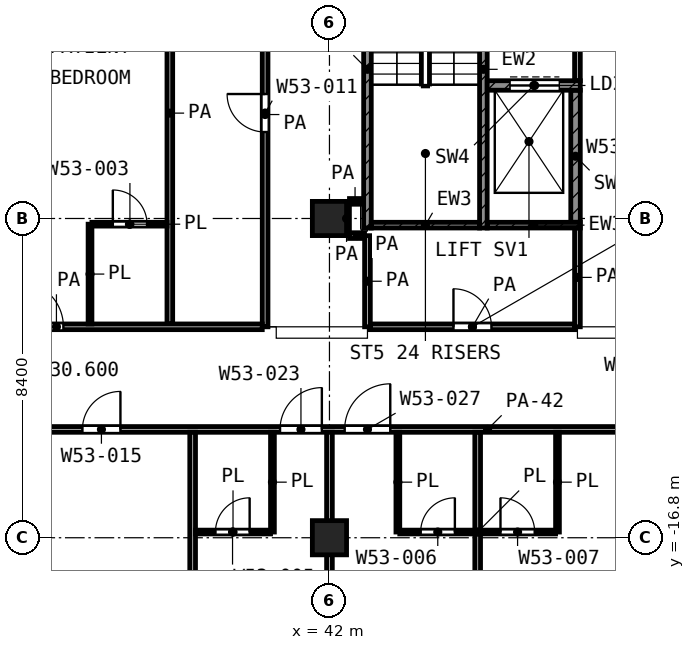
"""IFC4 building model, lengths in metres.
Left out: names, types, materials, properties, quantities, classifications, styles, units other than length and angle.
Written with IfcOpenShell. Run it as: python <this file> out.ifc"""

import sys

from ifc_helpers import new_model, si_unit, direction, frame, frame_2d, origin, origin_2d, place, context, subcontext, project, spatial, rectangle, extrude, element, fill, save


model = new_model("IFC4")
c1 = context("Model", 3, precision=1e-05, world=origin(), true_north=direction((0.0, 1.0)))
c2 = subcontext(c1, "Body", "Model", "MODEL_VIEW")
j1 = project(units=[si_unit("LENGTHUNIT", "METRE"), si_unit("PLANEANGLEUNIT", "RADIAN")], contexts=[c1])
p1 = place(None, origin())
s1 = spatial("IfcSite", under=j1, at=p1, CompositionType="ELEMENT")
p2 = place(p1, origin())
s2 = spatial("IfcBuilding", under=s1, at=p2, CompositionType="ELEMENT")
p3 = place(p2, frame((0.0, 0.0, 230.6)))
s3 = spatial("IfcBuildingStorey", under=s2, at=p3, CompositionType="ELEMENT", Elevation=230.6)
for number, where, z_axis, x_axis in (
    (1, (42.0, -8.4, 0.0), (0.0, 0.0, 1.0), (1.0, 0.0, 0.0)),
    (2, (42.0, -16.8, 0.0), (0.0, 0.0, 1.0), (1.0, 0.0, 0.0)),
):
    element("IfcColumn", number, at=place(p3, frame(where, z_axis=z_axis, x_axis=x_axis)), inside=s3, PredefinedType="COLUMN", context=c2, shape_type="SweptSolid", body=[
        extrude(rectangle(XDim=0.9, YDim=0.9, at=origin_2d()), origin(), (0.0, 0.0, 1.0), 4.2),
    ])
p4 = place(p3, frame((43.0, -8.65, 0.0), z_axis=(0.0, 0.0, 1.0), x_axis=(0.0, 1.0, 0.0)))
e3 = element("IfcWall", 3, at=p4, inside=s3, PredefinedType="SHEAR", context=c2, shape_type="SweptSolid", body=[
    extrude(rectangle(XDim=8.35, YDim=0.2, at=frame_2d((4.175, 0.0))), origin(), (0.0, 0.0, 1.0), 3.6),
])
p5 = place(p4, frame((7.0, 0.0, 0.0)))
e4 = element("IfcOpeningElement", 4, at=p5, cuts=e3, PredefinedType="OPENING", context=c2, shape_type="SweptSolid", body=[
    extrude(rectangle(XDim=1.1, YDim=2.1, at=frame_2d((0.55, 1.05))), frame((0.0, 0.11, 0.0), z_axis=(0.0, -1.0, 0.0), x_axis=(1.0, 0.0, 0.0)), (0.0, 0.0, 1.0), 0.22),
])
p6 = place(p3, frame((46.05, -8.65, 0.0), z_axis=(0.0, 0.0, 1.0), x_axis=(0.0, 1.0, 0.0)))
e5 = element("IfcWall", 5, at=p6, inside=s3, PredefinedType="SHEAR", context=c2, shape_type="SweptSolid", body=[
    extrude(rectangle(XDim=8.35, YDim=0.2, at=frame_2d((4.175, 0.0))), origin(), (0.0, 0.0, 1.0), 3.6),
])
p7 = place(p6, frame((7.0, 0.0, 0.0)))
e6 = element("IfcOpeningElement", 6, at=p7, cuts=e5, PredefinedType="OPENING", context=c2, shape_type="SweptSolid", body=[
    extrude(rectangle(XDim=1.1, YDim=2.1, at=frame_2d((0.55, 1.05))), frame((0.0, 0.11, 0.0), z_axis=(0.0, -1.0, 0.0), x_axis=(1.0, 0.0, 0.0)), (0.0, 0.0, 1.0), 0.22),
])
p8 = place(p3, frame((43.1, -8.575, 0.0), z_axis=(0.0, 0.0, 1.0), x_axis=(1.0, 0.0, 0.0)))
e7 = element("IfcWall", 7, at=p8, inside=s3, PredefinedType="SHEAR", context=c2, shape_type="SweptSolid", body=[
    extrude(rectangle(XDim=2.85, YDim=0.15, at=frame_2d((1.425, 0.0))), origin(), (0.0, 0.0, 1.0), 3.6),
])
p9 = place(p3, frame((46.15, -8.575, 0.0), z_axis=(0.0, 0.0, 1.0), x_axis=(1.0, 0.0, 0.0)))
e8 = element("IfcWall", 8, at=p9, inside=s3, PredefinedType="SHEAR", context=c2, shape_type="SweptSolid", body=[
    extrude(rectangle(XDim=2.45, YDim=0.15, at=frame_2d((1.225, 0.0))), origin(), (0.0, 0.0, 1.0), 3.6),
])
p10 = place(p3, frame((46.15, -4.9, 0.0), z_axis=(0.0, 0.0, 1.0), x_axis=(1.0, 0.0, 0.0)))
e9 = element("IfcWall", 9, at=p10, inside=s3, PredefinedType="SHEAR", context=c2, shape_type="SweptSolid", body=[
    extrude(rectangle(XDim=2.45, YDim=0.25, at=frame_2d((1.225, 0.0))), origin(), (0.0, 0.0, 1.0), 3.6),
])
p11 = place(p10, frame((0.6, 0.0, 0.0)))
e10 = element("IfcOpeningElement", 10, at=p11, cuts=e9, PredefinedType="OPENING", context=c2, shape_type="SweptSolid", body=[
    extrude(rectangle(XDim=1.3, YDim=2.1, at=frame_2d((0.65, 1.05))), frame((0.0, 0.135, 0.0), z_axis=(0.0, -1.0, 0.0), x_axis=(1.0, 0.0, 0.0)), (0.0, 0.0, 1.0), 0.27),
])
p12 = place(p3, frame((48.475, -8.5, 0.0), z_axis=(0.0, 0.0, 1.0), x_axis=(0.0, 1.0, 0.0)))
e11 = element("IfcWall", 11, at=p12, inside=s3, PredefinedType="SHEAR", context=c2, shape_type="SweptSolid", body=[
    extrude(rectangle(XDim=3.475, YDim=0.25, at=frame_2d((1.738, 0.0))), origin(), (0.0, 0.0, 1.0), 3.6),
])
p13 = place(p3, frame((48.525, -4.775, 0.0), z_axis=(0.0, 0.0, 1.0), x_axis=(0.0, 1.0, 0.0)))
e12 = element("IfcWall", 12, at=p13, inside=s3, PredefinedType="PARTITIONING", context=c2, shape_type="SweptSolid", body=[
    extrude(rectangle(XDim=4.325, YDim=0.15, at=frame_2d((2.163, 0.0))), origin(), (0.0, 0.0, 1.0), 3.6),
])
p14 = place(p13, frame((1.625, 0.0, 0.0)))
e13 = element("IfcOpeningElement", 13, at=p14, cuts=e12, PredefinedType="OPENING", context=c2, shape_type="SweptSolid", body=[
    extrude(rectangle(XDim=1.1, YDim=2.1, at=frame_2d((0.55, 1.05))), frame((0.0, 0.085, 0.0), z_axis=(0.0, -1.0, 0.0), x_axis=(1.0, 0.0, 0.0)), (0.0, 0.0, 1.0), 0.17),
])
p15 = place(p3, frame((38.475, -16.65, 0.0), z_axis=(0.0, 0.0, 1.0), x_axis=(1.0, 0.0, 0.0)))
e14 = element("IfcWall", 14, at=p15, inside=s3, PredefinedType="PARTITIONING", context=c2, shape_type="SweptSolid", body=[
    extrude(rectangle(XDim=1.975, YDim=0.1, at=frame_2d((0.987, 0.0))), origin(), (0.0, 0.0, 1.0), 3.6),
])
p16 = place(p15, frame((0.525, 0.0, 0.0)))
e15 = element("IfcOpeningElement", 15, at=p16, cuts=e14, PredefinedType="OPENING", context=c2, shape_type="SweptSolid", body=[
    extrude(rectangle(XDim=0.9, YDim=2.1, at=frame_2d((0.45, 1.05))), frame((0.0, 0.06, 0.0), z_axis=(0.0, -1.0, 0.0), x_axis=(1.0, 0.0, 0.0)), (0.0, 0.0, 1.0), 0.12),
])
p17 = place(p3, frame((43.85, -16.65, 0.0), z_axis=(0.0, 0.0, 1.0), x_axis=(1.0, 0.0, 0.0)))
e16 = element("IfcWall", 16, at=p17, inside=s3, PredefinedType="PARTITIONING", context=c2, shape_type="SweptSolid", body=[
    extrude(rectangle(XDim=4.1, YDim=0.1, at=frame_2d((2.05, 0.0))), origin(), (0.0, 0.0, 1.0), 3.6),
])
p18 = place(p17, frame((0.55, 0.0, 0.0)))
e17 = element("IfcOpeningElement", 17, at=p18, cuts=e16, PredefinedType="OPENING", context=c2, shape_type="SweptSolid", body=[
    extrude(rectangle(XDim=0.9, YDim=2.1, at=frame_2d((0.45, 1.05))), frame((0.0, 0.06, 0.0), z_axis=(0.0, -1.0, 0.0), x_axis=(1.0, 0.0, 0.0)), (0.0, 0.0, 1.0), 0.12),
])
p19 = place(p17, frame((2.65, 0.0, 0.0)))
e18 = element("IfcOpeningElement", 18, at=p19, cuts=e16, PredefinedType="OPENING", context=c2, shape_type="SweptSolid", body=[
    extrude(rectangle(XDim=0.9, YDim=2.1, at=frame_2d((0.45, 1.05))), frame((0.0, 0.06, 0.0), z_axis=(0.0, -1.0, 0.0), x_axis=(1.0, 0.0, 0.0)), (0.0, 0.0, 1.0), 0.12),
])
p20 = place(p3, frame((35.75, -8.55, 0.0), z_axis=(0.0, 0.0, 1.0), x_axis=(1.0, 0.0, 0.0)))
e19 = element("IfcWall", 19, at=p20, inside=s3, PredefinedType="PARTITIONING", context=c2, shape_type="SweptSolid", body=[
    extrude(rectangle(XDim=1.975, YDim=0.1, at=frame_2d((0.988, 0.0))), origin(), (0.0, 0.0, 1.0), 3.6),
])
p21 = place(p20, frame((0.55, 0.0, 0.0)))
e20 = element("IfcOpeningElement", 20, at=p21, cuts=e19, PredefinedType="OPENING", context=c2, shape_type="SweptSolid", body=[
    extrude(rectangle(XDim=0.9, YDim=2.1, at=frame_2d((0.45, 1.05))), frame((0.0, 0.06, 0.0), z_axis=(0.0, -1.0, 0.0), x_axis=(1.0, 0.0, 0.0)), (0.0, 0.0, 1.0), 0.12),
])
for number, where, z_axis, x_axis in (
    (21, (35.7, -11.175, 0.0), (0.0, 0.0, 1.0), (0.0, 1.0, 0.0)),
    (22, (40.5, -16.65, 0.0), (0.0, 0.0, 1.0), (0.0, 1.0, 0.0)),
    (23, (43.8, -16.65, 0.0), (0.0, 0.0, 1.0), (0.0, 1.0, 0.0)),
    (24, (48.0, -16.65, 0.0), (0.0, 0.0, 1.0), (0.0, 1.0, 0.0)),
):
    element("IfcWall", number, at=place(p3, frame(where, z_axis=z_axis, x_axis=x_axis)), inside=s3, PredefinedType="PARTITIONING", context=c2, shape_type="SweptSolid", body=[
        extrude(rectangle(XDim=2.625, YDim=0.1, at=frame_2d((1.312, 0.0))), origin(), (0.0, 0.0, 1.0), 3.6),
    ])
p22 = place(p3, frame((29.4, -13.95, 0.0), z_axis=(0.0, 0.0, 1.0), x_axis=(1.0, 0.0, 0.0)))
e25 = element("IfcWall", 25, at=p22, inside=s3, PredefinedType="PARTITIONING", context=c2, shape_type="SweptSolid", body=[
    extrude(rectangle(XDim=33.52, YDim=0.15, at=frame_2d((16.76, 0.0))), origin(), (0.0, 0.0, 1.0), 2.7),
])
p23 = place(p22, frame((1.5, 0.0, 0.0)))
e26 = element("IfcOpeningElement", 26, at=p23, cuts=e25, PredefinedType="OPENING", context=c2, shape_type="SweptSolid", body=[
    extrude(rectangle(XDim=1.2, YDim=2.1, at=frame_2d((0.6, 1.05))), frame((0.0, 0.085, 0.0), z_axis=(0.0, -1.0, 0.0), x_axis=(1.0, 0.0, 0.0)), (0.0, 0.0, 1.0), 0.17),
])
p24 = place(p22, frame((6.1, 0.0, 0.0)))
e27 = element("IfcOpeningElement", 27, at=p24, cuts=e25, PredefinedType="OPENING", context=c2, shape_type="SweptSolid", body=[
    extrude(rectangle(XDim=1.0, YDim=2.1, at=frame_2d((0.5, 1.05))), frame((0.0, 0.085, 0.0), z_axis=(0.0, -1.0, 0.0), x_axis=(1.0, 0.0, 0.0)), (0.0, 0.0, 1.0), 0.17),
])
p25 = place(p22, frame((11.3, 0.0, 0.0)))
e28 = element("IfcOpeningElement", 28, at=p25, cuts=e25, PredefinedType="OPENING", context=c2, shape_type="SweptSolid", body=[
    extrude(rectangle(XDim=1.1, YDim=2.1, at=frame_2d((0.55, 1.05))), frame((0.0, 0.085, 0.0), z_axis=(0.0, -1.0, 0.0), x_axis=(1.0, 0.0, 0.0)), (0.0, 0.0, 1.0), 0.17),
])
p26 = place(p22, frame((13.0, 0.0, 0.0)))
e29 = element("IfcOpeningElement", 29, at=p26, cuts=e25, PredefinedType="OPENING", context=c2, shape_type="SweptSolid", body=[
    extrude(rectangle(XDim=1.2, YDim=2.1, at=frame_2d((0.6, 1.05))), frame((0.0, 0.085, 0.0), z_axis=(0.0, -1.0, 0.0), x_axis=(1.0, 0.0, 0.0)), (0.0, 0.0, 1.0), 0.17),
])
p27 = place(p22, frame((22.6, 0.0, 0.0)))
e30 = element("IfcOpeningElement", 30, at=p27, cuts=e25, PredefinedType="OPENING", context=c2, shape_type="SweptSolid", body=[
    extrude(rectangle(XDim=1.2, YDim=2.1, at=frame_2d((0.6, 1.05))), frame((0.0, 0.085, 0.0), z_axis=(0.0, -1.0, 0.0), x_axis=(1.0, 0.0, 0.0)), (0.0, 0.0, 1.0), 0.17),
])
p28 = place(p22, frame((20.3, 0.0, 0.0)))
e31 = element("IfcOpeningElement", 31, at=p28, cuts=e25, PredefinedType="OPENING", context=c2, shape_type="SweptSolid", body=[
    extrude(rectangle(XDim=1.2, YDim=2.1, at=frame_2d((0.6, 1.05))), frame((0.0, 0.085, 0.0), z_axis=(0.0, -1.0, 0.0), x_axis=(1.0, 0.0, 0.0)), (0.0, 0.0, 1.0), 0.17),
])
p29 = place(p22, frame((28.0, 0.0, 0.0)))
e32 = element("IfcOpeningElement", 32, at=p29, cuts=e25, PredefinedType="OPENING", context=c2, shape_type="SweptSolid", body=[
    extrude(rectangle(XDim=1.2, YDim=2.1, at=frame_2d((0.6, 1.05))), frame((0.0, 0.085, 0.0), z_axis=(0.0, -1.0, 0.0), x_axis=(1.0, 0.0, 0.0)), (0.0, 0.0, 1.0), 0.17),
])
p30 = place(p22, frame((31.0, 0.0, 0.0)))
e33 = element("IfcOpeningElement", 33, at=p30, cuts=e25, PredefinedType="OPENING", context=c2, shape_type="SweptSolid", body=[
    extrude(rectangle(XDim=1.0, YDim=2.1, at=frame_2d((0.5, 1.05))), frame((0.0, 0.085, 0.0), z_axis=(0.0, -1.0, 0.0), x_axis=(1.0, 0.0, 0.0)), (0.0, 0.0, 1.0), 0.17),
])
p31 = place(p3, frame((29.4, -11.25, 0.0), z_axis=(0.0, 0.0, 1.0), x_axis=(1.0, 0.0, 0.0)))
e34 = element("IfcWall", 34, at=p31, inside=s3, PredefinedType="PARTITIONING", context=c2, shape_type="SweptSolid", body=[
    extrude(rectangle(XDim=10.832, YDim=0.15, at=frame_2d((5.416, 0.0))), origin(), (0.0, 0.0, 1.0), 3.6),
])
p32 = place(p31, frame((4.4, 0.0, 0.0)))
e35 = element("IfcOpeningElement", 35, at=p32, cuts=e34, PredefinedType="OPENING", context=c2, shape_type="SweptSolid", body=[
    extrude(rectangle(XDim=1.2, YDim=2.1, at=frame_2d((0.6, 1.05))), frame((0.0, 0.085, 0.0), z_axis=(0.0, -1.0, 0.0), x_axis=(1.0, 0.0, 0.0)), (0.0, 0.0, 1.0), 0.17),
])
p33 = place(p31, frame((1.5, 0.0, 0.0)))
e36 = element("IfcOpeningElement", 36, at=p33, cuts=e34, PredefinedType="OPENING", context=c2, shape_type="SweptSolid", body=[
    extrude(rectangle(XDim=1.2, YDim=2.1, at=frame_2d((0.6, 1.05))), frame((0.0, 0.085, 0.0), z_axis=(0.0, -1.0, 0.0), x_axis=(1.0, 0.0, 0.0)), (0.0, 0.0, 1.0), 0.17),
])
p34 = place(p3, frame((43.075, -11.25, 0.0), z_axis=(0.0, 0.0, 1.0), x_axis=(1.0, 0.0, 0.0)))
e37 = element("IfcWall", 37, at=p34, inside=s3, PredefinedType="PARTITIONING", context=c2, shape_type="SweptSolid", body=[
    extrude(rectangle(XDim=5.375, YDim=0.15, at=frame_2d((2.688, 0.0))), origin(), (0.0, 0.0, 1.0), 3.6),
])
p35 = place(p34, frame((2.188, 0.0, 0.0)))
e38 = element("IfcOpeningElement", 38, at=p35, cuts=e37, PredefinedType="OPENING", context=c2, shape_type="SweptSolid", body=[
    extrude(rectangle(XDim=1.0, YDim=2.1, at=frame_2d((0.5, 1.05))), frame((0.0, 0.085, 0.0), z_axis=(0.0, -1.0, 0.0), x_axis=(1.0, 0.0, 0.0)), (0.0, 0.0, 1.0), 0.17),
])
p36 = place(p3, frame((42.527, -8.85, 0.0), z_axis=(0.0, 0.0, 1.0), x_axis=(1.0, 0.0, 0.0)))
e39 = element("IfcWall", 39, at=p36, inside=s3, PredefinedType="PARTITIONING", context=c2, shape_type="SweptSolid", body=[
    extrude(rectangle(XDim=0.396, YDim=0.15, at=frame_2d((0.198, 0.0))), origin(), (0.0, 0.0, 1.0), 3.6),
])
p37 = place(p3, frame((42.527, -7.95, 0.0), z_axis=(0.0, 0.0, 1.0), x_axis=(1.0, 0.0, 0.0)))
e40 = element("IfcWall", 40, at=p37, inside=s3, PredefinedType="PARTITIONING", context=c2, shape_type="SweptSolid", body=[
    extrude(rectangle(XDim=0.293, YDim=0.15, at=frame_2d((0.146, 0.0))), origin(), (0.0, 0.0, 1.0), 3.6),
])
p38 = place(p3, frame((37.8, -11.175, 0.0), z_axis=(0.0, 0.0, 1.0), x_axis=(0.0, 1.0, 0.0)))
e41 = element("IfcWall", 41, at=p38, inside=s3, PredefinedType="PARTITIONING", context=c2, shape_type="SweptSolid", body=[
    extrude(rectangle(XDim=11.095, YDim=0.15, at=frame_2d((5.547, 0.0))), origin(), (0.0, 0.0, 1.0), 3.6),
])
p39 = place(p3, frame((38.4, -25.12, 0.0), z_axis=(0.0, 0.0, 1.0), x_axis=(0.0, 1.0, 0.0)))
e42 = element("IfcWall", 42, at=p39, inside=s3, PredefinedType="PARTITIONING", context=c2, shape_type="SweptSolid", body=[
    extrude(rectangle(XDim=11.095, YDim=0.15, at=frame_2d((5.548, 0.0))), origin(), (0.0, 0.0, 1.0), 3.6),
])
p40 = place(p3, frame((40.307, -11.25, 0.0), z_axis=(0.0, 0.0, 1.0), x_axis=(0.0, 1.0, 0.0)))
e43 = element("IfcWall", 43, at=p40, inside=s3, PredefinedType="PARTITIONING", context=c2, shape_type="SweptSolid", body=[
    extrude(rectangle(XDim=11.17, YDim=0.15, at=frame_2d((5.585, 0.0))), origin(), (0.0, 0.0, 1.0), 3.6),
])
p41 = place(p40, frame((5.125, 0.0, 0.0)))
e44 = element("IfcOpeningElement", 44, at=p41, cuts=e43, PredefinedType="OPENING", context=c2, shape_type="SweptSolid", body=[
    extrude(rectangle(XDim=1.0, YDim=2.1, at=frame_2d((0.5, 1.05))), frame((0.0, 0.085, 0.0), z_axis=(0.0, -1.0, 0.0), x_axis=(1.0, 0.0, 0.0)), (0.0, 0.0, 1.0), 0.17),
])
p42 = place(p3, frame((42.0, -25.12, 0.0), z_axis=(0.0, 0.0, 1.0), x_axis=(0.0, 1.0, 0.0)))
e45 = element("IfcWall", 45, at=p42, inside=s3, PredefinedType="PARTITIONING", context=c2, shape_type="SweptSolid", body=[
    extrude(rectangle(XDim=11.095, YDim=0.15, at=frame_2d((5.548, 0.0))), origin(), (0.0, 0.0, 1.0), 3.6),
])
p43 = place(p3, frame((42.45, -8.849, 0.0), z_axis=(0.0, 0.0, 1.0), x_axis=(0.0, 1.0, 0.0)))
e46 = element("IfcWall", 46, at=p43, inside=s3, PredefinedType="PARTITIONING", context=c2, shape_type="SweptSolid", body=[
    extrude(rectangle(XDim=0.897, YDim=0.15, at=frame_2d((0.449, 0.0))), origin(), (0.0, 0.0, 1.0), 3.6),
])
p44 = place(p3, frame((43.0, -11.25, 0.0), z_axis=(0.0, 0.0, 1.0), x_axis=(0.0, 1.0, 0.0)))
e47 = element("IfcWall", 47, at=p44, inside=s3, PredefinedType="PARTITIONING", context=c2, shape_type="SweptSolid", body=[
    extrude(rectangle(XDim=2.398, YDim=0.15, at=frame_2d((1.199, 0.0))), origin(), (0.0, 0.0, 1.0), 3.6),
])
p45 = place(p3, frame((45.9, -25.12, 0.0), z_axis=(0.0, 0.0, 1.0), x_axis=(0.0, 1.0, 0.0)))
e48 = element("IfcWall", 48, at=p45, inside=s3, PredefinedType="PARTITIONING", context=c2, shape_type="SweptSolid", body=[
    extrude(rectangle(XDim=11.095, YDim=0.15, at=frame_2d((5.548, 0.0))), origin(), (0.0, 0.0, 1.0), 3.6),
])
p46 = place(p3, frame((48.525, -11.25, 0.0), z_axis=(0.0, 0.0, 1.0), x_axis=(0.0, 1.0, 0.0)))
e49 = element("IfcWall", 49, at=p46, inside=s3, PredefinedType="PARTITIONING", context=c2, shape_type="SweptSolid", body=[
    extrude(rectangle(XDim=2.6, YDim=0.15, at=frame_2d((1.3, 0.0))), origin(), (0.0, 0.0, 1.0), 3.6),
])
p47 = place(p11, origin())
e50 = element("IfcDoor", 50, at=p47, inside=s3, OperationType="DOUBLE_DOOR_SLIDING", PredefinedType="DOOR", context=c2, shape_type="SweptSolid", body=[
    extrude(rectangle(XDim=1.3, YDim=2.1, at=frame_2d((0.65, 1.05))), frame((0.0, 0.025, 0.0), z_axis=(0.0, -1.0, 0.0), x_axis=(1.0, 0.0, 0.0)), (0.0, 0.0, 1.0), 0.05),
])
fill(e10, e50)
p48 = place(p32, origin())
e51 = element("IfcDoor", 51, at=p48, inside=s3, OperationType="SINGLE_SWING_LEFT", PredefinedType="DOOR", context=c2, shape_type="SweptSolid", body=[
    extrude(rectangle(XDim=1.2, YDim=2.1, at=frame_2d((0.6, 1.05))), frame((0.0, 0.025, 0.0), z_axis=(0.0, -1.0, 0.0), x_axis=(1.0, 0.0, 0.0)), (0.0, 0.0, 1.0), 0.05),
])
fill(e35, e51)
p49 = place(p21, origin())
e52 = element("IfcDoor", 52, at=p49, inside=s3, OperationType="SINGLE_SWING_LEFT", PredefinedType="DOOR", context=c2, shape_type="SweptSolid", body=[
    extrude(rectangle(XDim=0.9, YDim=2.1, at=frame_2d((0.45, 1.05))), frame((0.0, 0.025, 0.0), z_axis=(0.0, -1.0, 0.0), x_axis=(1.0, 0.0, 0.0)), (0.0, 0.0, 1.0), 0.05),
])
fill(e20, e52)
p50 = place(p41, origin())
e53 = element("IfcDoor", 53, at=p50, inside=s3, OperationType="SINGLE_SWING_RIGHT", PredefinedType="DOOR", context=c2, shape_type="SweptSolid", body=[
    extrude(rectangle(XDim=1.0, YDim=2.1, at=frame_2d((0.5, 1.05))), frame((0.0, 0.025, 0.0), z_axis=(0.0, -1.0, 0.0), x_axis=(1.0, 0.0, 0.0)), (0.0, 0.0, 1.0), 0.05),
])
fill(e44, e53)
p51 = place(p35, origin())
e54 = element("IfcDoor", 54, at=p51, inside=s3, OperationType="SINGLE_SWING_LEFT", PredefinedType="DOOR", context=c2, shape_type="SweptSolid", body=[
    extrude(rectangle(XDim=1.0, YDim=2.1, at=frame_2d((0.5, 1.05))), frame((0.0, 0.025, 0.0), z_axis=(0.0, -1.0, 0.0), x_axis=(1.0, 0.0, 0.0)), (0.0, 0.0, 1.0), 0.05),
])
fill(e38, e54)
p52 = place(p24, origin())
e55 = element("IfcDoor", 55, at=p52, inside=s3, OperationType="SINGLE_SWING_RIGHT", PredefinedType="DOOR", context=c2, shape_type="SweptSolid", body=[
    extrude(rectangle(XDim=1.0, YDim=2.1, at=frame_2d((0.5, 1.05))), frame((0.0, 0.025, 0.0), z_axis=(0.0, -1.0, 0.0), x_axis=(1.0, 0.0, 0.0)), (0.0, 0.0, 1.0), 0.05),
])
fill(e27, e55)
p53 = place(p25, origin())
e56 = element("IfcDoor", 56, at=p53, inside=s3, OperationType="SINGLE_SWING_RIGHT", PredefinedType="DOOR", context=c2, shape_type="SweptSolid", body=[
    extrude(rectangle(XDim=1.1, YDim=2.1, at=frame_2d((0.55, 1.05))), frame((0.0, 0.025, 0.0), z_axis=(0.0, -1.0, 0.0), x_axis=(1.0, 0.0, 0.0)), (0.0, 0.0, 1.0), 0.05),
])
fill(e28, e56)
p54 = place(p16, origin())
e57 = element("IfcDoor", 57, at=p54, inside=s3, OperationType="SINGLE_SWING_RIGHT", PredefinedType="DOOR", context=c2, shape_type="SweptSolid", body=[
    extrude(rectangle(XDim=0.9, YDim=2.1, at=frame_2d((0.45, 1.05))), frame((0.0, 0.025, 0.0), z_axis=(0.0, -1.0, 0.0), x_axis=(1.0, 0.0, 0.0)), (0.0, 0.0, 1.0), 0.05),
])
fill(e15, e57)
p55 = place(p26, origin())
e58 = element("IfcDoor", 58, at=p55, inside=s3, OperationType="SINGLE_SWING_RIGHT", PredefinedType="DOOR", context=c2, shape_type="SweptSolid", body=[
    extrude(rectangle(XDim=1.2, YDim=2.1, at=frame_2d((0.6, 1.05))), frame((0.0, 0.025, 0.0), z_axis=(0.0, -1.0, 0.0), x_axis=(1.0, 0.0, 0.0)), (0.0, 0.0, 1.0), 0.05),
])
fill(e29, e58)
p56 = place(p18, origin())
e59 = element("IfcDoor", 59, at=p56, inside=s3, OperationType="SINGLE_SWING_RIGHT", PredefinedType="DOOR", context=c2, shape_type="SweptSolid", body=[
    extrude(rectangle(XDim=0.9, YDim=2.1, at=frame_2d((0.45, 1.05))), frame((0.0, 0.025, 0.0), z_axis=(0.0, -1.0, 0.0), x_axis=(1.0, 0.0, 0.0)), (0.0, 0.0, 1.0), 0.05),
])
fill(e17, e59)
p57 = place(p19, origin())
e60 = element("IfcDoor", 60, at=p57, inside=s3, OperationType="SINGLE_SWING_LEFT", PredefinedType="DOOR", context=c2, shape_type="SweptSolid", body=[
    extrude(rectangle(XDim=0.9, YDim=2.1, at=frame_2d((0.45, 1.05))), frame((0.0, 0.025, 0.0), z_axis=(0.0, -1.0, 0.0), x_axis=(1.0, 0.0, 0.0)), (0.0, 0.0, 1.0), 0.05),
])
fill(e18, e60)
save(model, sys.argv[1])
